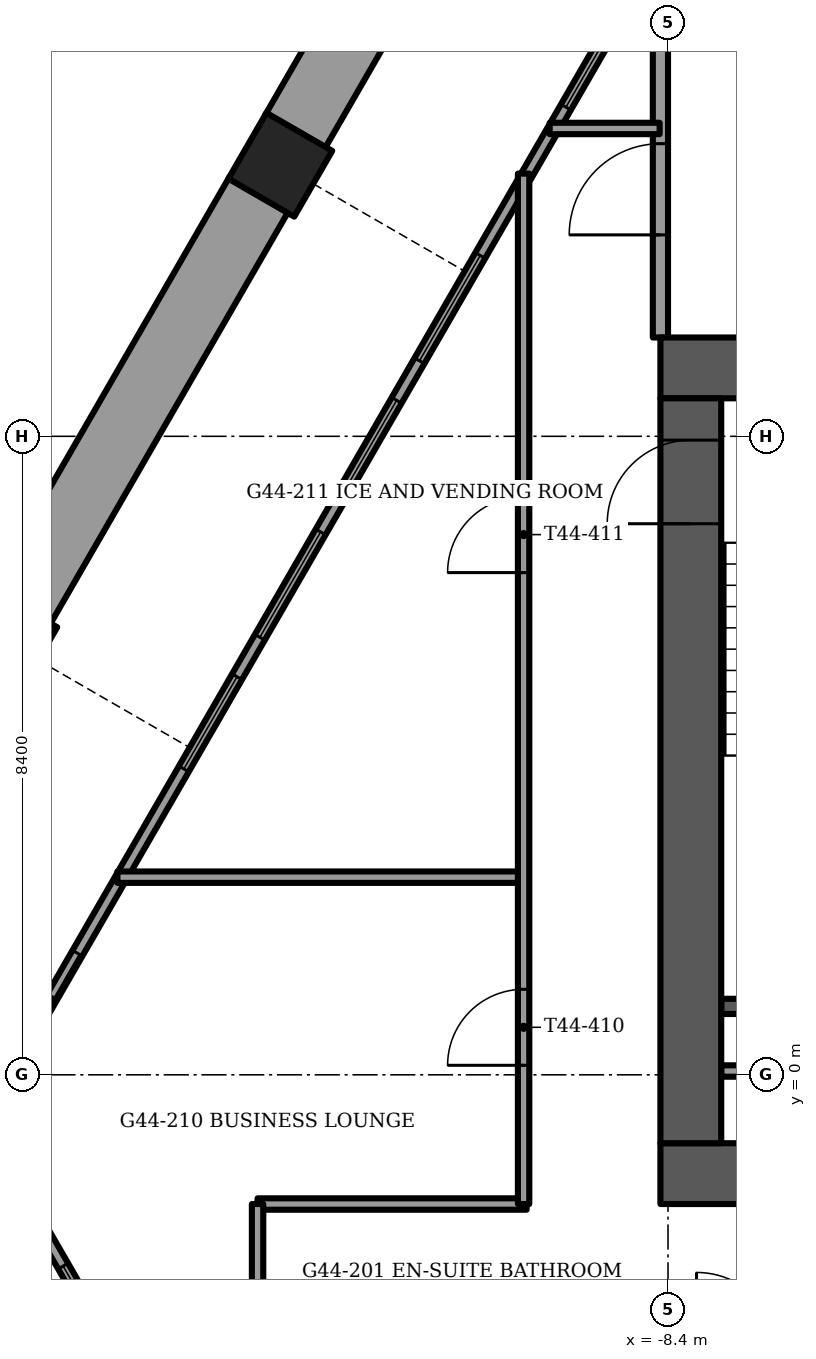
"""IFC4 building model, lengths in metres.
Left out: names, types, materials, properties, quantities, classifications, styles, units other than length and angle.
Written with IfcOpenShell. Run it as: python <this file> out.ifc"""

import sys

from ifc_helpers import new_model, si_unit, direction, frame, frame_2d, origin, origin_2d, place, context, subcontext, project, spatial, rectangle, extrude, element, fill, save


model = new_model("IFC4")
c1 = context("Model", 3, precision=1e-05, world=origin(), true_north=direction((0.0, 1.0)))
c2 = subcontext(c1, "Body", "Model", "MODEL_VIEW")
j1 = project(units=[si_unit("LENGTHUNIT", "METRE"), si_unit("PLANEANGLEUNIT", "RADIAN")], contexts=[c1])
p1 = place(None, origin())
s1 = spatial("IfcSite", under=j1, at=p1, CompositionType="ELEMENT")
p2 = place(p1, origin())
s2 = spatial("IfcBuilding", under=s1, at=p2, CompositionType="ELEMENT")
p3 = place(p2, frame((0.0, 0.0, 179.5)))
s3 = spatial("IfcBuildingStorey", under=s2, at=p3, CompositionType="ELEMENT", Elevation=179.5)
for number, where, z_axis, x_axis in (
    (1, (-13.501, 11.972, -1.2), (0.0, 0.0, 1.0), (0.5, 0.866, 0.0)),
    (2, (-17.119, 5.706, -1.2), (0.0, 0.0, 1.0), (0.5, 0.866, 0.0)),
):
    element("IfcColumn", number, at=place(p3, frame(where, z_axis=z_axis, x_axis=x_axis)), inside=s3, PredefinedType="COLUMN", context=c2, shape_type="SweptSolid", body=[
        extrude(rectangle(XDim=1.0, YDim=1.0, at=origin_2d()), origin(), (0.0, 0.0, 1.0), 3.75),
    ])
p4 = place(p3, frame((-8.5, -1.3, -0.3), z_axis=(0.0, 0.0, 1.0), x_axis=(1.0, 0.0, 0.0)))
e3 = element("IfcWall", 3, at=p4, inside=s3, PredefinedType="SHEAR", context=c2, shape_type="SweptSolid", body=[
    extrude(rectangle(XDim=17.0, YDim=0.8, at=frame_2d((8.5, 0.0))), origin(), (0.0, 0.0, 1.0), 3.75),
])
p5 = place(p4, frame((7.7, 0.0, 0.0)))
e4 = element("IfcOpeningElement", 4, at=p5, cuts=e3, PredefinedType="OPENING", context=c2, shape_type="SweptSolid", body=[
    extrude(rectangle(XDim=1.6, YDim=2.1, at=frame_2d((0.8, 1.05))), frame((0.0, 0.4, 0.0), z_axis=(0.0, -1.0, 0.0), x_axis=(1.0, 0.0, 0.0)), (0.0, 0.0, 1.0), 0.8),
])
p6 = place(p3, frame((-8.5, 9.3, -0.3), z_axis=(0.0, 0.0, 1.0), x_axis=(1.0, 0.0, 0.0)))
e5 = element("IfcWall", 5, at=p6, inside=s3, PredefinedType="SHEAR", context=c2, shape_type="SweptSolid", body=[
    extrude(rectangle(XDim=17.0, YDim=0.8, at=frame_2d((8.5, 0.0))), origin(), (0.0, 0.0, 1.0), 3.75),
])
p7 = place(p6, frame((7.7, 0.0, 0.0)))
e6 = element("IfcOpeningElement", 6, at=p7, cuts=e5, PredefinedType="OPENING", context=c2, shape_type="SweptSolid", body=[
    extrude(rectangle(XDim=1.6, YDim=2.1, at=frame_2d((0.8, 1.05))), frame((0.0, 0.4, 0.0), z_axis=(0.0, -1.0, 0.0), x_axis=(1.0, 0.0, 0.0)), (0.0, 0.0, 1.0), 0.8),
])
p8 = place(p6, frame((1.75, 0.0, 0.0)))
e7 = element("IfcOpeningElement", 7, at=p8, cuts=e5, PredefinedType="OPENING", context=c2, shape_type="SweptSolid", body=[
    extrude(rectangle(XDim=1.1, YDim=2.1, at=frame_2d((0.55, 1.05))), frame((0.0, 0.4, 0.0), z_axis=(0.0, -1.0, 0.0), x_axis=(1.0, 0.0, 0.0)), (0.0, 0.0, 1.0), 0.8),
])
p9 = place(p6, frame((14.15, 0.0, 0.0)))
e8 = element("IfcOpeningElement", 8, at=p9, cuts=e5, PredefinedType="OPENING", context=c2, shape_type="SweptSolid", body=[
    extrude(rectangle(XDim=1.1, YDim=2.1, at=frame_2d((0.55, 1.05))), frame((0.0, 0.4, 0.0), z_axis=(0.0, -1.0, 0.0), x_axis=(1.0, 0.0, 0.0)), (0.0, 0.0, 1.0), 0.8),
])
p10 = place(p3, frame((-8.1, -0.9, -0.3), z_axis=(0.0, 0.0, 1.0), x_axis=(0.0, 1.0, 0.0)))
e9 = element("IfcWall", 9, at=p10, inside=s3, PredefinedType="SHEAR", context=c2, shape_type="SweptSolid", body=[
    extrude(rectangle(XDim=9.8, YDim=0.8, at=frame_2d((4.9, 0.0))), origin(), (0.0, 0.0, 1.0), 3.75),
])
p11 = place(p10, frame((8.15, 0.0, 0.0)))
e10 = element("IfcOpeningElement", 10, at=p11, cuts=e9, PredefinedType="OPENING", context=c2, shape_type="SweptSolid", body=[
    extrude(rectangle(XDim=1.1, YDim=2.1, at=frame_2d((0.55, 1.05))), frame((0.0, 0.4, 0.0), z_axis=(0.0, -1.0, 0.0), x_axis=(1.0, 0.0, 0.0)), (0.0, 0.0, 1.0), 0.8),
])
p12 = place(p3, frame((-10.147, 17.88, 0.0), z_axis=(0.0, 0.0, 1.0), x_axis=(-0.500000968981, -0.866024844342, 0.0)))
e11 = element("IfcWall", 11, at=p12, inside=s3, PredefinedType="PARAPET", context=c2, shape_type="SweptSolid", body=[
    extrude(rectangle(XDim=6.323, YDim=0.9, at=frame_2d((3.162, 0.0))), origin(), (0.0, 0.0, 1.0), 1.1),
])
p13 = place(p3, frame((-13.779, 11.59, 0.0), z_axis=(0.0, 0.0, 1.0), x_axis=(-0.499984268907, -0.866034485945, 0.0)))
e12 = element("IfcWall", 12, at=p13, inside=s3, PredefinedType="PARAPET", context=c2, shape_type="SweptSolid", body=[
    extrude(rectangle(XDim=6.296, YDim=0.9, at=frame_2d((3.148, 0.0))), origin(), (0.0, 0.0, 1.0), 1.1),
])
p14 = place(p3, frame((-7.109, 17.292, 0.0), z_axis=(0.0, 0.0, 1.0), x_axis=(-0.499999728453, -0.866025560562, 0.0)))
e13 = element("IfcWall", 13, at=p14, inside=s3, PredefinedType="SOLIDWALL", context=c2, shape_type="SweptSolid", body=[
    extrude(rectangle(XDim=20.071, YDim=0.15, at=frame_2d((10.035, 0.0))), origin(), (0.0, 0.0, 1.0), 3.45),
])
p15 = place(p14, frame((3.868, 0.0, 0.15)))
e14 = element("IfcOpeningElement", 14, at=p15, cuts=e13, PredefinedType="OPENING", context=c2, shape_type="SweptSolid", body=[
    extrude(rectangle(XDim=1.4, YDim=2.85, at=frame_2d((0.7, 1.425))), frame((0.0, 0.075, 0.0), z_axis=(0.0, -1.0, 0.0), x_axis=(1.0, 0.0, 0.0)), (0.0, 0.0, 1.0), 0.15),
])
p16 = place(p14, frame((7.521, 0.0, 0.15)))
e15 = element("IfcOpeningElement", 15, at=p16, cuts=e13, PredefinedType="OPENING", context=c2, shape_type="SweptSolid", body=[
    extrude(rectangle(XDim=1.6, YDim=2.85, at=frame_2d((0.8, 1.425))), frame((0.0, 0.075, 0.0), z_axis=(0.0, -1.0, 0.0), x_axis=(1.0, 0.0, 0.0)), (0.0, 0.0, 1.0), 0.15),
])
p17 = place(p14, frame((9.721, 0.0, 0.15)))
e16 = element("IfcOpeningElement", 16, at=p17, cuts=e13, PredefinedType="OPENING", context=c2, shape_type="SweptSolid", body=[
    extrude(rectangle(XDim=1.4, YDim=2.85, at=frame_2d((0.7, 1.425))), frame((0.0, 0.075, 0.0), z_axis=(0.0, -1.0, 0.0), x_axis=(1.0, 0.0, 0.0)), (0.0, 0.0, 1.0), 0.15),
])
p18 = place(p14, frame((11.721, 0.0, 0.15)))
e17 = element("IfcOpeningElement", 17, at=p18, cuts=e13, PredefinedType="OPENING", context=c2, shape_type="SweptSolid", body=[
    extrude(rectangle(XDim=1.6, YDim=2.85, at=frame_2d((0.8, 1.425))), frame((0.0, 0.075, 0.0), z_axis=(0.0, -1.0, 0.0), x_axis=(1.0, 0.0, 0.0)), (0.0, 0.0, 1.0), 0.15),
])
p19 = place(p14, frame((13.921, 0.0, 0.15)))
e18 = element("IfcOpeningElement", 18, at=p19, cuts=e13, PredefinedType="OPENING", context=c2, shape_type="SweptSolid", body=[
    extrude(rectangle(XDim=1.4, YDim=2.85, at=frame_2d((0.7, 1.425))), frame((0.0, 0.075, 0.0), z_axis=(0.0, -1.0, 0.0), x_axis=(1.0, 0.0, 0.0)), (0.0, 0.0, 1.0), 0.15),
])
p20 = place(p14, frame((18.121, 0.0, 0.0)))
e19 = element("IfcOpeningElement", 19, at=p20, cuts=e13, PredefinedType="OPENING", context=c2, shape_type="SweptSolid", body=[
    extrude(rectangle(XDim=1.4, YDim=2.4, at=frame_2d((0.7, 1.2))), frame((0.0, 0.075, 0.0), z_axis=(0.0, -1.0, 0.0), x_axis=(1.0, 0.0, 0.0)), (0.0, 0.0, 1.0), 0.15),
])
p21 = place(p14, frame((0.452, 0.0, 0.15)))
e20 = element("IfcOpeningElement", 20, at=p21, cuts=e13, PredefinedType="OPENING", context=c2, shape_type="SweptSolid", body=[
    extrude(rectangle(XDim=1.6, YDim=2.73, at=frame_2d((0.8, 1.365))), frame((0.0, 0.075, 0.0), z_axis=(0.0, -1.0, 0.0), x_axis=(1.0, 0.0, 0.0)), (0.0, 0.0, 1.0), 0.15),
])
p22 = place(p3, frame((-17.145, -1.154, 0.0), z_axis=(0.0, 0.0, 1.0), x_axis=(0.500005248668, -0.866022373443, 0.0)))
e21 = element("IfcWall", 21, at=p22, inside=s3, PredefinedType="SOLIDWALL", context=c2, shape_type="SweptSolid", body=[
    extrude(rectangle(XDim=15.145, YDim=0.15, at=frame_2d((7.573, 0.0))), origin(), (0.0, 0.0, 1.0), 3.45),
])
p23 = place(p22, frame((1.573, 0.0, 0.15)))
e22 = element("IfcOpeningElement", 22, at=p23, cuts=e21, PredefinedType="OPENING", context=c2, shape_type="SweptSolid", body=[
    extrude(rectangle(XDim=0.9, YDim=2.85, at=frame_2d((0.45, 1.425))), frame((0.0, 0.075, 0.0), z_axis=(0.0, -1.0, 0.0), x_axis=(1.0, 0.0, 0.0)), (0.0, 0.0, 1.0), 0.15),
])
p24 = place(p22, frame((3.773, 0.0, 0.15)))
e23 = element("IfcOpeningElement", 23, at=p24, cuts=e21, PredefinedType="OPENING", context=c2, shape_type="SweptSolid", body=[
    extrude(rectangle(XDim=1.4, YDim=2.85, at=frame_2d((0.7, 1.425))), frame((0.0, 0.075, 0.0), z_axis=(0.0, -1.0, 0.0), x_axis=(1.0, 0.0, 0.0)), (0.0, 0.0, 1.0), 0.15),
])
p25 = place(p22, frame((6.266, 0.0, 0.15)))
e24 = element("IfcOpeningElement", 24, at=p25, cuts=e21, PredefinedType="OPENING", context=c2, shape_type="SweptSolid", body=[
    extrude(rectangle(XDim=1.6, YDim=2.85, at=frame_2d((0.8, 1.425))), frame((0.0, 0.075, 0.0), z_axis=(0.0, -1.0, 0.0), x_axis=(1.0, 0.0, 0.0)), (0.0, 0.0, 1.0), 0.15),
])
p26 = place(p22, frame((7.973, 0.0, 0.0)))
e25 = element("IfcOpeningElement", 25, at=p26, cuts=e21, PredefinedType="OPENING", context=c2, shape_type="SweptSolid", body=[
    extrude(rectangle(XDim=1.4, YDim=2.4, at=frame_2d((0.7, 1.2))), frame((0.0, 0.075, 0.0), z_axis=(0.0, -1.0, 0.0), x_axis=(1.0, 0.0, 0.0)), (0.0, 0.0, 1.0), 0.15),
])
p27 = place(p22, frame((9.973, 0.0, 0.15)))
e26 = element("IfcOpeningElement", 26, at=p27, cuts=e21, PredefinedType="OPENING", context=c2, shape_type="SweptSolid", body=[
    extrude(rectangle(XDim=0.9, YDim=2.85, at=frame_2d((0.45, 1.425))), frame((0.0, 0.075, 0.0), z_axis=(0.0, -1.0, 0.0), x_axis=(1.0, 0.0, 0.0)), (0.0, 0.0, 1.0), 0.15),
])
p28 = place(p3, frame((-7.7, 0.9, -0.3), z_axis=(0.0, 0.0, 1.0), x_axis=(1.0, 0.0, 0.0)))
e27 = element("IfcWall", 27, at=p28, inside=s3, PredefinedType="SOLIDWALL", context=c2, shape_type="SweptSolid", body=[
    extrude(rectangle(XDim=3.25, YDim=0.2, at=frame_2d((1.625, 0.0))), origin(), (0.0, 0.0, 1.0), 3.75),
])
p29 = place(p3, frame((-7.7, 0.05, 0.0), z_axis=(0.0, 0.0, 1.0), x_axis=(1.0, 0.0, 0.0)))
e28 = element("IfcWall", 28, at=p29, inside=s3, PredefinedType="PARTITIONING", context=c2, shape_type="SweptSolid", body=[
    extrude(rectangle(XDim=3.9, YDim=0.15, at=frame_2d((1.95, 0.0))), origin(), (0.0, 0.0, 1.0), 3.45),
])
p30 = place(p3, frame((-8.5, 9.7, 0.0), z_axis=(0.0, 0.0, 1.0), x_axis=(0.0, 1.0, 0.0)))
e29 = element("IfcWall", 29, at=p30, inside=s3, PredefinedType="PARTITIONING", context=c2, shape_type="SweptSolid", body=[
    extrude(rectangle(XDim=3.9, YDim=0.2, at=frame_2d((1.95, 0.0))), origin(), (0.0, 0.0, 1.0), 3.45),
])
p31 = place(p30, frame((1.35, 0.0, 0.0)))
e30 = element("IfcOpeningElement", 30, at=p31, cuts=e29, PredefinedType="OPENING", context=c2, shape_type="SweptSolid", body=[
    extrude(rectangle(XDim=1.2, YDim=2.1, at=frame_2d((0.6, 1.05))), frame((0.0, 0.1, 0.0), z_axis=(0.0, -1.0, 0.0), x_axis=(1.0, 0.0, 0.0)), (0.0, 0.0, 1.0), 0.2),
])
p32 = place(p3, frame((-13.8, -1.7, 0.0), z_axis=(0.0, 0.0, 1.0), x_axis=(1.0, 0.0, 0.0)))
e31 = element("IfcWall", 31, at=p32, inside=s3, PredefinedType="PARTITIONING", context=c2, shape_type="SweptSolid", body=[
    extrude(rectangle(XDim=3.54, YDim=0.15, at=frame_2d((1.77, 0.0))), origin(), (0.0, 0.0, 1.0), 3.45),
])
p33 = place(p3, frame((-15.644, 2.6, 0.0), z_axis=(0.0, 0.0, 1.0), x_axis=(1.0, 0.0, 0.0)))
e32 = element("IfcWall", 32, at=p33, inside=s3, PredefinedType="PARTITIONING", context=c2, shape_type="SweptSolid", body=[
    extrude(rectangle(XDim=5.344, YDim=0.15, at=frame_2d((2.672, 0.0))), origin(), (0.0, 0.0, 1.0), 3.45),
])
p34 = place(p3, frame((-9.957, 12.45, 0.0), z_axis=(0.0, 0.0, 1.0), x_axis=(1.0, 0.0, 0.0)))
e33 = element("IfcWall", 33, at=p34, inside=s3, PredefinedType="PARTITIONING", context=c2, shape_type="SweptSolid", body=[
    extrude(rectangle(XDim=1.447, YDim=0.15, at=frame_2d((0.724, 0.0))), origin(), (0.0, 0.0, 1.0), 3.45),
])
p35 = place(p3, frame((-10.3, -1.7, 0.0), z_axis=(0.0, 0.0, 1.0), x_axis=(0.0, 1.0, 0.0)))
e34 = element("IfcWall", 34, at=p35, inside=s3, PredefinedType="PARTITIONING", context=c2, shape_type="SweptSolid", body=[
    extrude(rectangle(XDim=13.556, YDim=0.15, at=frame_2d((6.778, 0.0))), origin(), (0.0, 0.0, 1.0), 3.45),
])
p36 = place(p35, frame((1.825, 0.0, 0.0)))
e35 = element("IfcOpeningElement", 35, at=p36, cuts=e34, PredefinedType="OPENING", context=c2, shape_type="SweptSolid", body=[
    extrude(rectangle(XDim=1.0, YDim=2.1, at=frame_2d((0.5, 1.05))), frame((0.0, 0.075, 0.0), z_axis=(0.0, -1.0, 0.0), x_axis=(1.0, 0.0, 0.0)), (0.0, 0.0, 1.0), 0.15),
])
p37 = place(p35, frame((8.307, 0.0, 0.0)))
e36 = element("IfcOpeningElement", 36, at=p37, cuts=e34, PredefinedType="OPENING", context=c2, shape_type="SweptSolid", body=[
    extrude(rectangle(XDim=1.0, YDim=2.1, at=frame_2d((0.5, 1.05))), frame((0.0, 0.075, 0.0), z_axis=(0.0, -1.0, 0.0), x_axis=(1.0, 0.0, 0.0)), (0.0, 0.0, 1.0), 0.15),
])
p38 = place(p3, frame((-13.8, -3.7, 0.0), z_axis=(0.0, 0.0, 1.0), x_axis=(0.0, 1.0, 0.0)))
e37 = element("IfcWall", 37, at=p38, inside=s3, PredefinedType="PARTITIONING", context=c2, shape_type="SweptSolid", body=[
    extrude(rectangle(XDim=2.0, YDim=0.15, at=frame_2d((1.0, 0.0))), origin(), (0.0, 0.0, 1.0), 3.45),
])
p39 = place(p15, origin())
e38 = element("IfcWindow", 38, at=p39, inside=s3, PartitioningType="SINGLE_PANEL", PredefinedType="WINDOW", context=c2, shape_type="SweptSolid", body=[
    extrude(rectangle(XDim=1.4, YDim=2.85, at=frame_2d((0.7, 1.425))), frame((0.0, 0.03, 0.0), z_axis=(0.0, -1.0, 0.0), x_axis=(1.0, 0.0, 0.0)), (0.0, 0.0, 1.0), 0.06),
])
fill(e14, e38)
p40 = place(p16, origin())
e39 = element("IfcWindow", 39, at=p40, inside=s3, PartitioningType="SINGLE_PANEL", PredefinedType="WINDOW", context=c2, shape_type="SweptSolid", body=[
    extrude(rectangle(XDim=1.6, YDim=2.85, at=frame_2d((0.8, 1.425))), frame((0.0, 0.03, 0.0), z_axis=(0.0, -1.0, 0.0), x_axis=(1.0, 0.0, 0.0)), (0.0, 0.0, 1.0), 0.06),
])
fill(e15, e39)
p41 = place(p17, origin())
e40 = element("IfcWindow", 40, at=p41, inside=s3, PartitioningType="SINGLE_PANEL", PredefinedType="WINDOW", context=c2, shape_type="SweptSolid", body=[
    extrude(rectangle(XDim=1.4, YDim=2.85, at=frame_2d((0.7, 1.425))), frame((0.0, 0.03, 0.0), z_axis=(0.0, -1.0, 0.0), x_axis=(1.0, 0.0, 0.0)), (0.0, 0.0, 1.0), 0.06),
])
fill(e16, e40)
p42 = place(p18, origin())
e41 = element("IfcWindow", 41, at=p42, inside=s3, PartitioningType="SINGLE_PANEL", PredefinedType="WINDOW", context=c2, shape_type="SweptSolid", body=[
    extrude(rectangle(XDim=1.6, YDim=2.85, at=frame_2d((0.8, 1.425))), frame((0.0, 0.03, 0.0), z_axis=(0.0, -1.0, 0.0), x_axis=(1.0, 0.0, 0.0)), (0.0, 0.0, 1.0), 0.06),
])
fill(e17, e41)
p43 = place(p19, origin())
e42 = element("IfcWindow", 42, at=p43, inside=s3, PartitioningType="SINGLE_PANEL", PredefinedType="WINDOW", context=c2, shape_type="SweptSolid", body=[
    extrude(rectangle(XDim=1.4, YDim=2.85, at=frame_2d((0.7, 1.425))), frame((0.0, 0.03, 0.0), z_axis=(0.0, -1.0, 0.0), x_axis=(1.0, 0.0, 0.0)), (0.0, 0.0, 1.0), 0.06),
])
fill(e18, e42)
p44 = place(p20, origin())
e43 = element("IfcDoor", 43, at=p44, inside=s3, OperationType="SLIDING_TO_RIGHT", PredefinedType="DOOR", context=c2, shape_type="SweptSolid", body=[
    extrude(rectangle(XDim=1.4, YDim=2.4, at=frame_2d((0.7, 1.2))), frame((0.0, 0.025, 0.0), z_axis=(0.0, -1.0, 0.0), x_axis=(1.0, 0.0, 0.0)), (0.0, 0.0, 1.0), 0.05),
])
fill(e19, e43)
p45 = place(p23, origin())
e44 = element("IfcWindow", 44, at=p45, inside=s3, PartitioningType="SINGLE_PANEL", PredefinedType="WINDOW", context=c2, shape_type="SweptSolid", body=[
    extrude(rectangle(XDim=0.9, YDim=2.85, at=frame_2d((0.45, 1.425))), frame((0.0, 0.03, 0.0), z_axis=(0.0, -1.0, 0.0), x_axis=(1.0, 0.0, 0.0)), (0.0, 0.0, 1.0), 0.06),
])
fill(e22, e44)
p46 = place(p11, origin())
e45 = element("IfcDoor", 45, at=p46, inside=s3, OperationType="SINGLE_SWING_RIGHT", PredefinedType="DOOR", context=c2, shape_type="SweptSolid", body=[
    extrude(rectangle(XDim=1.1, YDim=2.1, at=frame_2d((0.55, 1.05))), frame((0.0, 0.025, 0.0), z_axis=(0.0, -1.0, 0.0), x_axis=(1.0, 0.0, 0.0)), (0.0, 0.0, 1.0), 0.05),
])
fill(e10, e45)
p47 = place(p31, origin())
e46 = element("IfcDoor", 46, at=p47, inside=s3, OperationType="SINGLE_SWING_LEFT", PredefinedType="DOOR", context=c2, shape_type="SweptSolid", body=[
    extrude(rectangle(XDim=1.2, YDim=2.1, at=frame_2d((0.6, 1.05))), frame((0.0, 0.025, 0.0), z_axis=(0.0, -1.0, 0.0), x_axis=(1.0, 0.0, 0.0)), (0.0, 0.0, 1.0), 0.05),
])
fill(e30, e46)
p48 = place(p36, origin())
e47 = element("IfcDoor", 47, at=p48, inside=s3, OperationType="SINGLE_SWING_RIGHT", PredefinedType="DOOR", context=c2, shape_type="SweptSolid", body=[
    extrude(rectangle(XDim=1.0, YDim=2.1, at=frame_2d((0.5, 1.05))), frame((0.0, 0.025, 0.0), z_axis=(0.0, -1.0, 0.0), x_axis=(1.0, 0.0, 0.0)), (0.0, 0.0, 1.0), 0.05),
])
fill(e35, e47)
p49 = place(p37, origin())
e48 = element("IfcDoor", 48, at=p49, inside=s3, OperationType="SINGLE_SWING_LEFT", PredefinedType="DOOR", context=c2, shape_type="SweptSolid", body=[
    extrude(rectangle(XDim=1.0, YDim=2.1, at=frame_2d((0.5, 1.05))), frame((0.0, 0.025, 0.0), z_axis=(0.0, -1.0, 0.0), x_axis=(1.0, 0.0, 0.0)), (0.0, 0.0, 1.0), 0.05),
])
fill(e36, e48)
save(model, sys.argv[1])
